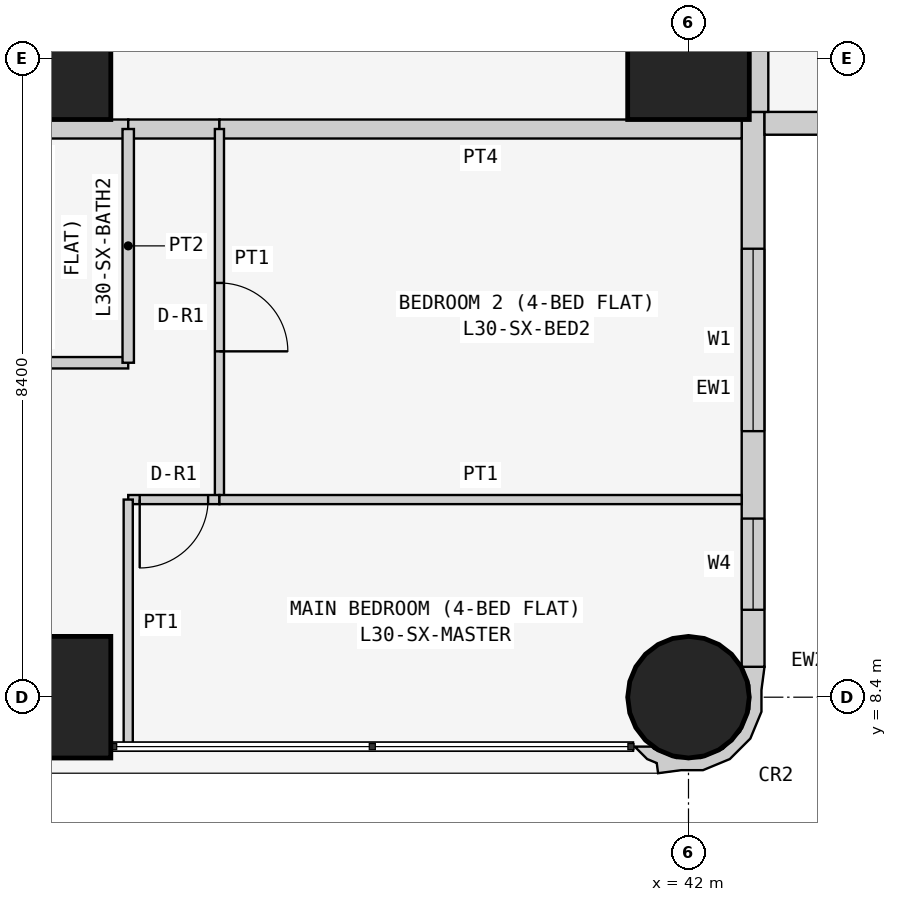
"""IFC4 building model, lengths in metres.
Left out: names, types, materials, properties, quantities, classifications, styles, units other than length and angle.
Written with IfcOpenShell. Run it as: python <this file> out.ifc"""

import sys

from ifc_helpers import new_model, si_unit, direction, frame, frame_2d, origin, origin_2d, place, context, subcontext, project, spatial, polyline, rectangle, circle, outline, extrude, element, fill, save


model = new_model("IFC4")
c1 = context("Model", 3, precision=1e-05, world=origin(), true_north=direction((0.0, 1.0)))
c2 = subcontext(c1, "Body", "Model", "MODEL_VIEW")
j1 = project(units=[si_unit("LENGTHUNIT", "METRE"), si_unit("PLANEANGLEUNIT", "RADIAN")], contexts=[c1])
p1 = place(None, origin())
s1 = spatial("IfcSite", under=j1, at=p1, CompositionType="ELEMENT")
p2 = place(p1, origin())
s2 = spatial("IfcBuilding", under=s1, at=p2, CompositionType="ELEMENT")
p3 = place(p2, frame((0.0, 0.0, 119.7)))
s3 = spatial("IfcBuildingStorey", under=s2, at=p3, CompositionType="ELEMENT", Elevation=119.7)
for number, where, z_axis, x_axis in (
    (1, (33.6, 8.4, 0.0), (0.0, 0.0, 1.0), (1.0, 0.0, 0.0)),
    (2, (33.6, 16.8, 0.0), (0.0, 0.0, 1.0), (1.0, 0.0, 0.0)),
):
    element("IfcColumn", number, at=place(p3, frame(where, z_axis=z_axis, x_axis=x_axis)), inside=s3, PredefinedType="COLUMN", context=c2, shape_type="SweptSolid", body=[
        extrude(rectangle(XDim=1.6, YDim=1.6, at=origin_2d()), origin(), (0.0, 0.0, 1.0), 3.6),
    ])
p4 = place(p3, frame((42.0, 8.4, 0.0), z_axis=(0.0, 0.0, 1.0), x_axis=(1.0, 0.0, 0.0)))
e3 = element("IfcColumn", 3, at=p4, inside=s3, PredefinedType="COLUMN", context=c2, shape_type="SweptSolid", body=[
    extrude(circle(Radius=0.8, at=origin_2d()), origin(), (0.0, 0.0, 1.0), 3.6),
])
p5 = place(p3, frame((42.0, 16.8, 0.0), z_axis=(0.0, 0.0, 1.0), x_axis=(1.0, 0.0, 0.0)))
e4 = element("IfcColumn", 4, at=p5, inside=s3, PredefinedType="COLUMN", context=c2, shape_type="SweptSolid", body=[
    extrude(rectangle(XDim=1.6, YDim=1.6, at=origin_2d()), origin(), (0.0, 0.0, 1.0), 3.6),
])
p6 = place(p3, frame((42.85, 8.8, 0.0), z_axis=(0.0, 0.0, 1.0), x_axis=(0.0, 1.0, 0.0)))
e5 = element("IfcWall", 5, at=p6, inside=s3, PredefinedType="SOLIDWALL", context=c2, shape_type="SweptSolid", body=[
    extrude(rectangle(XDim=7.3, YDim=0.3, at=frame_2d((3.65, 0.0))), origin(), (0.0, 0.0, 1.0), 3.45),
])
p7 = place(p6, frame((3.1, 0.0, 0.9)))
e6 = element("IfcOpeningElement", 6, at=p7, cuts=e5, PredefinedType="OPENING", context=c2, shape_type="SweptSolid", body=[
    extrude(rectangle(XDim=2.4, YDim=1.5, at=frame_2d((1.2, 0.75))), frame((0.0, 0.16, 0.0), z_axis=(0.0, -1.0, 0.0), x_axis=(1.0, 0.0, 0.0)), (0.0, 0.0, 1.0), 0.32),
])
p8 = place(p6, frame((0.75, 0.0, 0.9)))
e7 = element("IfcOpeningElement", 7, at=p8, cuts=e5, PredefinedType="OPENING", context=c2, shape_type="SweptSolid", body=[
    extrude(rectangle(XDim=1.2, YDim=1.5, at=frame_2d((0.6, 0.75))), frame((0.0, 0.16, 0.0), z_axis=(0.0, -1.0, 0.0), x_axis=(1.0, 0.0, 0.0)), (0.0, 0.0, 1.0), 0.32),
])
p9 = place(p3, frame((43.0, 15.95, 0.0), z_axis=(0.0, 0.0, 1.0), x_axis=(1.0, 0.0, 0.0)))
e8 = element("IfcWall", 8, at=p9, inside=s3, PredefinedType="SOLIDWALL", context=c2, shape_type="SweptSolid", body=[
    extrude(rectangle(XDim=15.4, YDim=0.3, at=frame_2d((7.7, 0.0))), origin(), (0.0, 0.0, 1.0), 3.45),
])
p10 = place(p9, frame((1.2, 0.0, 0.9)))
e9 = element("IfcOpeningElement", 9, at=p10, cuts=e8, PredefinedType="OPENING", context=c2, shape_type="SweptSolid", body=[
    extrude(rectangle(XDim=1.8, YDim=1.5, at=frame_2d((0.9, 0.75))), frame((0.0, 0.16, 0.0), z_axis=(0.0, -1.0, 0.0), x_axis=(1.0, 0.0, 0.0)), (0.0, 0.0, 1.0), 0.32),
])
p11 = place(p9, frame((4.95, 0.0, 1.5)))
e10 = element("IfcOpeningElement", 10, at=p11, cuts=e8, PredefinedType="OPENING", context=c2, shape_type="SweptSolid", body=[
    extrude(rectangle(XDim=0.9, YDim=0.7, at=frame_2d((0.45, 0.35))), frame((0.0, 0.16, 0.0), z_axis=(0.0, -1.0, 0.0), x_axis=(1.0, 0.0, 0.0)), (0.0, 0.0, 1.0), 0.32),
])
p12 = place(p9, frame((8.5, 0.0, 0.9)))
e11 = element("IfcOpeningElement", 11, at=p12, cuts=e8, PredefinedType="OPENING", context=c2, shape_type="SweptSolid", body=[
    extrude(rectangle(XDim=1.8, YDim=1.5, at=frame_2d((0.9, 0.75))), frame((0.0, 0.16, 0.0), z_axis=(0.0, -1.0, 0.0), x_axis=(1.0, 0.0, 0.0)), (0.0, 0.0, 1.0), 0.32),
])
p13 = place(p9, frame((12.5, 0.0, 0.0)))
e12 = element("IfcOpeningElement", 12, at=p13, cuts=e8, PredefinedType="OPENING", context=c2, shape_type="SweptSolid", body=[
    extrude(rectangle(XDim=0.9, YDim=2.4, at=frame_2d((0.45, 1.2))), frame((0.0, 0.16, 0.0), z_axis=(0.0, -1.0, 0.0), x_axis=(1.0, 0.0, 0.0)), (0.0, 0.0, 1.0), 0.32),
])
p14 = place(p9, frame((13.5, 0.0, 0.9)))
e13 = element("IfcOpeningElement", 13, at=p14, cuts=e8, PredefinedType="OPENING", context=c2, shape_type="SweptSolid", body=[
    extrude(rectangle(XDim=1.2, YDim=1.5, at=frame_2d((0.6, 0.75))), frame((0.0, 0.16, 0.0), z_axis=(0.0, -1.0, 0.0), x_axis=(1.0, 0.0, 0.0)), (0.0, 0.0, 1.0), 0.32),
])
p15 = place(p3, frame((41.352, 7.805, 0.0), z_axis=(0.0, 0.0, 1.0), x_axis=(0.343276641956, -0.93923434088, 0.0)))
e14 = element("IfcWall", 14, at=p15, inside=s3, PredefinedType="SOLIDWALL", context=c2, shape_type="SweptSolid", body=[
    extrude(outline(polyline([(-0.369, 1.89), (-0.509, 1.621), (-0.49, 1.615), (-0.479, 1.609), (-0.211, 1.62), (0.088, 1.511), (0.323, 1.295), (0.457, 1.006), (0.47, 0.688), (0.361, 0.389), (0.145, 0.154), (0.108, 0.136), (0.031, -0.075), (0.241, 0.023), (0.333, 0.124), (0.465, 0.094), (0.532, 0.393), (0.631, 0.663), (0.614, 1.044), (0.453, 1.391), (0.172, 1.649), (-0.097, 1.748), (-0.369, 1.89)])), origin(), (0.0, 0.0, 1.0), 3.45),
])
p16 = place(p3, frame((42.925, 22.971, 0.0), z_axis=(0.0, 0.0, 1.0), x_axis=(0.0, -1.0, 0.0)))
e15 = element("IfcWall", 15, at=p16, inside=s3, PredefinedType="PARTITIONING", context=c2, shape_type="SweptSolid", body=[
    extrude(rectangle(XDim=6.871, YDim=0.25, at=frame_2d((3.436, 0.0))), origin(), (0.0, 0.0, 1.0), 3.45),
])
p17 = place(p3, frame((34.629, 15.875, 0.0), z_axis=(0.0, 0.0, 1.0), x_axis=(-1.0, 0.0, 0.0)))
e16 = element("IfcWall", 16, at=p17, inside=s3, PredefinedType="PARTITIONING", context=c2, shape_type="SweptSolid", body=[
    extrude(rectangle(XDim=2.629, YDim=0.25, at=frame_2d((1.314, 0.0))), origin(), (0.0, 0.0, 1.0), 3.45),
])
p18 = place(p3, frame((35.829, 15.875, 0.0), z_axis=(0.0, 0.0, 1.0), x_axis=(-1.0, 0.0, 0.0)))
e17 = element("IfcWall", 17, at=p18, inside=s3, PredefinedType="PARTITIONING", context=c2, shape_type="SweptSolid", body=[
    extrude(rectangle(XDim=1.2, YDim=0.25, at=frame_2d((0.6, 0.0))), origin(), (0.0, 0.0, 1.0), 3.45),
])
p19 = place(p3, frame((42.7, 15.875, 0.0), z_axis=(0.0, 0.0, 1.0), x_axis=(-1.0, 0.0, 0.0)))
e18 = element("IfcWall", 18, at=p19, inside=s3, PredefinedType="PARTITIONING", context=c2, shape_type="SweptSolid", body=[
    extrude(rectangle(XDim=6.871, YDim=0.25, at=frame_2d((3.436, 0.0))), origin(), (0.0, 0.0, 1.0), 3.45),
])
p20 = place(p3, frame((32.0, 12.8, 0.0), z_axis=(0.0, 0.0, 1.0), x_axis=(1.0, 0.0, 0.0)))
e19 = element("IfcWall", 19, at=p20, inside=s3, PredefinedType="PARTITIONING", context=c2, shape_type="SweptSolid", body=[
    extrude(rectangle(XDim=2.629, YDim=0.15, at=frame_2d((1.314, 0.0))), origin(), (0.0, 0.0, 1.0), 3.45),
])
p21 = place(p3, frame((34.629, 12.8, 0.0), z_axis=(0.0, 0.0, 1.0), x_axis=(0.0, 1.0, 0.0)))
e20 = element("IfcWall", 20, at=p21, inside=s3, PredefinedType="PARTITIONING", context=c2, shape_type="SweptSolid", body=[
    extrude(rectangle(XDim=3.075, YDim=0.15, at=frame_2d((1.538, 0.0))), origin(), (0.0, 0.0, 1.0), 3.45),
])
p22 = place(p3, frame((35.829, 15.875, 0.0), z_axis=(0.0, 0.0, 1.0), x_axis=(0.0, -1.0, 0.0)))
e21 = element("IfcWall", 21, at=p22, inside=s3, PredefinedType="PARTITIONING", context=c2, shape_type="SweptSolid", body=[
    extrude(rectangle(XDim=4.875, YDim=0.12, at=frame_2d((2.438, 0.0))), origin(), (0.0, 0.0, 1.0), 3.45),
])
p23 = place(p22, frame((2.025, 0.0, 0.0)))
e22 = element("IfcOpeningElement", 22, at=p23, cuts=e21, PredefinedType="OPENING", context=c2, shape_type="SweptSolid", body=[
    extrude(rectangle(XDim=0.9, YDim=2.1, at=frame_2d((0.45, 1.05))), frame((0.0, 0.07, 0.0), z_axis=(0.0, -1.0, 0.0), x_axis=(1.0, 0.0, 0.0)), (0.0, 0.0, 1.0), 0.14),
])
p24 = place(p3, frame((35.829, 11.0, 0.0), z_axis=(0.0, 0.0, 1.0), x_axis=(-1.0, 0.0, 0.0)))
e23 = element("IfcWall", 23, at=p24, inside=s3, PredefinedType="PARTITIONING", context=c2, shape_type="SweptSolid", body=[
    extrude(rectangle(XDim=1.2, YDim=0.12, at=frame_2d((0.6, 0.0))), origin(), (0.0, 0.0, 1.0), 3.45),
])
p25 = place(p24, frame((0.149, 0.0, 0.0)))
e24 = element("IfcOpeningElement", 24, at=p25, cuts=e23, PredefinedType="OPENING", context=c2, shape_type="SweptSolid", body=[
    extrude(rectangle(XDim=0.9, YDim=2.1, at=frame_2d((0.45, 1.05))), frame((0.0, 0.07, 0.0), z_axis=(0.0, -1.0, 0.0), x_axis=(1.0, 0.0, 0.0)), (0.0, 0.0, 1.0), 0.14),
])
p26 = place(p3, frame((34.629, 11.0, 0.0), z_axis=(0.0, 0.0, 1.0), x_axis=(0.0, -1.0, 0.0)))
e25 = element("IfcWall", 25, at=p26, inside=s3, PredefinedType="PARTITIONING", context=c2, shape_type="SweptSolid", body=[
    extrude(rectangle(XDim=3.25, YDim=0.12, at=frame_2d((1.625, 0.0))), origin(), (0.0, 0.0, 1.0), 3.45),
])
p27 = place(p3, frame((35.829, 11.0, 0.0), z_axis=(0.0, 0.0, 1.0), x_axis=(1.0, 0.0, 0.0)))
e26 = element("IfcWall", 26, at=p27, inside=s3, PredefinedType="PARTITIONING", context=c2, shape_type="SweptSolid", body=[
    extrude(rectangle(XDim=6.871, YDim=0.12, at=frame_2d((3.436, 0.0))), origin(), (0.0, 0.0, 1.0), 3.45),
])
p28 = place(p7, origin())
e27 = element("IfcWindow", 27, at=p28, inside=s3, PartitioningType="SINGLE_PANEL", PredefinedType="WINDOW", context=c2, shape_type="SweptSolid", body=[
    extrude(rectangle(XDim=2.4, YDim=1.5, at=frame_2d((1.2, 0.75))), frame((0.0, 0.03, 0.0), z_axis=(0.0, -1.0, 0.0), x_axis=(1.0, 0.0, 0.0)), (0.0, 0.0, 1.0), 0.06),
])
fill(e6, e27)
p29 = place(p8, origin())
e28 = element("IfcWindow", 28, at=p29, inside=s3, PartitioningType="SINGLE_PANEL", PredefinedType="WINDOW", context=c2, shape_type="SweptSolid", body=[
    extrude(rectangle(XDim=1.2, YDim=1.5, at=frame_2d((0.6, 0.75))), frame((0.0, 0.03, 0.0), z_axis=(0.0, -1.0, 0.0), x_axis=(1.0, 0.0, 0.0)), (0.0, 0.0, 1.0), 0.06),
])
fill(e7, e28)
p30 = place(p23, origin())
e29 = element("IfcDoor", 29, at=p30, inside=s3, OperationType="SINGLE_SWING_RIGHT", PredefinedType="DOOR", context=c2, shape_type="SweptSolid", body=[
    extrude(rectangle(XDim=0.9, YDim=2.1, at=frame_2d((0.45, 1.05))), frame((0.0, 0.025, 0.0), z_axis=(0.0, -1.0, 0.0), x_axis=(1.0, 0.0, 0.0)), (0.0, 0.0, 1.0), 0.05),
])
fill(e22, e29)
p31 = place(p25, origin())
e30 = element("IfcDoor", 30, at=p31, inside=s3, OperationType="SINGLE_SWING_RIGHT", PredefinedType="DOOR", context=c2, shape_type="SweptSolid", body=[
    extrude(rectangle(XDim=0.9, YDim=2.1, at=frame_2d((0.45, 1.05))), frame((0.0, 0.025, 0.0), z_axis=(0.0, -1.0, 0.0), x_axis=(1.0, 0.0, 0.0)), (0.0, 0.0, 1.0), 0.05),
])
fill(e24, e30)
save(model, sys.argv[1])
